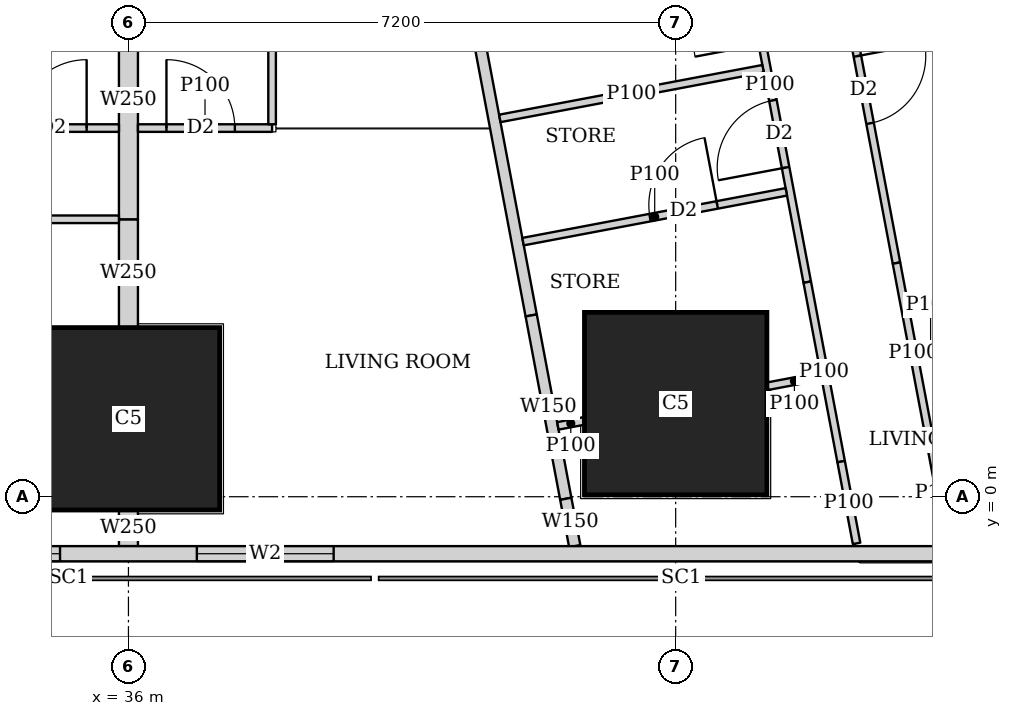
"""IFC4 building model, lengths in metres.
Left out: names, types, materials, properties, quantities, classifications, styles, units other than length and angle.
Written with IfcOpenShell. Run it as: python <this file> out.ifc"""

import sys

from ifc_helpers import new_model, si_unit, direction, frame, frame_2d, origin, origin_2d, place, context, subcontext, project, spatial, rectangle, extrude, element, fill, save


model = new_model("IFC4")
c1 = context("Model", 3, precision=1e-05, world=origin(), true_north=direction((0.0, 1.0)))
c2 = subcontext(c1, "Body", "Model", "MODEL_VIEW")
j1 = project(units=[si_unit("LENGTHUNIT", "METRE"), si_unit("PLANEANGLEUNIT", "RADIAN")], contexts=[c1])
p1 = place(None, origin())
s1 = spatial("IfcSite", under=j1, at=p1, CompositionType="ELEMENT")
p2 = place(p1, origin())
s2 = spatial("IfcBuilding", under=s1, at=p2, CompositionType="ELEMENT")
p3 = place(p2, frame((0.0, 0.0, 227.45)))
s3 = spatial("IfcBuildingStorey", under=s2, at=p3, CompositionType="ELEMENT", Elevation=227.45)
for number, where, z_axis, x_axis in (
    (1, (36.0, 1.025, 0.0), (0.0, 0.0, 1.0), (1.0, 0.0, 0.0)),
    (2, (43.2, 1.225, 0.0), (0.0, 0.0, 1.0), (1.0, 0.0, 0.0)),
):
    element("IfcColumn", number, at=place(p3, frame(where, z_axis=z_axis, x_axis=x_axis)), inside=s3, PredefinedType="COLUMN", context=c2, shape_type="SweptSolid", body=[
        extrude(rectangle(XDim=2.4, YDim=2.4, at=origin_2d()), origin(), (0.0, 0.0, 1.0), 3.75),
    ])
p4 = place(p3, frame((14.563, -0.75, 0.0), z_axis=(0.0, 0.0, 1.0), x_axis=(1.0, 0.0, 0.0)))
e3 = element("IfcWall", 3, at=p4, inside=s3, PredefinedType="SOLIDWALL", context=c2, shape_type="SweptSolid", body=[
    extrude(rectangle(XDim=33.228, YDim=0.2, at=frame_2d((16.614, 0.0))), origin(), (0.0, 0.0, 1.0), 3.5),
])
p5 = place(p4, frame((2.319, 0.0, 0.9)))
e4 = element("IfcOpeningElement", 4, at=p5, cuts=e3, PredefinedType="OPENING", context=c2, shape_type="SweptSolid", body=[
    extrude(rectangle(XDim=2.4, YDim=1.5, at=frame_2d((1.2, 0.75))), frame((0.0, 0.11, 0.0), z_axis=(0.0, -1.0, 0.0), x_axis=(1.0, 0.0, 0.0)), (0.0, 0.0, 1.0), 0.22),
])
p6 = place(p4, frame((7.937, 0.0, 0.9)))
e5 = element("IfcOpeningElement", 5, at=p6, cuts=e3, PredefinedType="OPENING", context=c2, shape_type="SweptSolid", body=[
    extrude(rectangle(XDim=1.8, YDim=1.5, at=frame_2d((0.9, 0.75))), frame((0.0, 0.11, 0.0), z_axis=(0.0, -1.0, 0.0), x_axis=(1.0, 0.0, 0.0)), (0.0, 0.0, 1.0), 0.22),
])
p7 = place(p4, frame((11.537, 0.0, 0.9)))
e6 = element("IfcOpeningElement", 6, at=p7, cuts=e3, PredefinedType="OPENING", context=c2, shape_type="SweptSolid", body=[
    extrude(rectangle(XDim=1.8, YDim=1.5, at=frame_2d((0.9, 0.75))), frame((0.0, 0.11, 0.0), z_axis=(0.0, -1.0, 0.0), x_axis=(1.0, 0.0, 0.0)), (0.0, 0.0, 1.0), 0.22),
])
p8 = place(p4, frame((15.137, 0.0, 0.9)))
e7 = element("IfcOpeningElement", 7, at=p8, cuts=e3, PredefinedType="OPENING", context=c2, shape_type="SweptSolid", body=[
    extrude(rectangle(XDim=1.8, YDim=1.5, at=frame_2d((0.9, 0.75))), frame((0.0, 0.11, 0.0), z_axis=(0.0, -1.0, 0.0), x_axis=(1.0, 0.0, 0.0)), (0.0, 0.0, 1.0), 0.22),
])
p9 = place(p4, frame((18.737, 0.0, 0.9)))
e8 = element("IfcOpeningElement", 8, at=p9, cuts=e3, PredefinedType="OPENING", context=c2, shape_type="SweptSolid", body=[
    extrude(rectangle(XDim=1.8, YDim=1.5, at=frame_2d((0.9, 0.75))), frame((0.0, 0.11, 0.0), z_axis=(0.0, -1.0, 0.0), x_axis=(1.0, 0.0, 0.0)), (0.0, 0.0, 1.0), 0.22),
])
p10 = place(p4, frame((22.337, 0.0, 0.9)))
e9 = element("IfcOpeningElement", 9, at=p10, cuts=e3, PredefinedType="OPENING", context=c2, shape_type="SweptSolid", body=[
    extrude(rectangle(XDim=1.8, YDim=1.5, at=frame_2d((0.9, 0.75))), frame((0.0, 0.11, 0.0), z_axis=(0.0, -1.0, 0.0), x_axis=(1.0, 0.0, 0.0)), (0.0, 0.0, 1.0), 0.22),
])
p11 = place(p3, frame((50.653, 2.703, 0.0), z_axis=(0.0, 0.0, 1.0), x_axis=(-0.185612026696, 0.982623109613, 0.0)))
e10 = element("IfcWall", 10, at=p11, inside=s3, PredefinedType="SOLIDWALL", context=c2, shape_type="SweptSolid", body=[
    extrude(rectangle(XDim=41.393, YDim=0.2, at=frame_2d((20.697, 0.0))), origin(), (0.0, 0.0, 1.0), 3.5),
])
p12 = place(p11, frame((1.633, 0.0, 0.9)))
e11 = element("IfcOpeningElement", 11, at=p12, cuts=e10, PredefinedType="OPENING", context=c2, shape_type="SweptSolid", body=[
    extrude(rectangle(XDim=1.8, YDim=1.5, at=frame_2d((0.9, 0.75))), frame((0.0, 0.11, 0.0), z_axis=(0.0, -1.0, 0.0), x_axis=(1.0, 0.0, 0.0)), (0.0, 0.0, 1.0), 0.22),
])
p13 = place(p11, frame((6.032, 0.0, 0.9)))
e12 = element("IfcOpeningElement", 12, at=p13, cuts=e10, PredefinedType="OPENING", context=c2, shape_type="SweptSolid", body=[
    extrude(rectangle(XDim=1.8, YDim=1.5, at=frame_2d((0.9, 0.75))), frame((0.0, 0.11, 0.0), z_axis=(0.0, -1.0, 0.0), x_axis=(1.0, 0.0, 0.0)), (0.0, 0.0, 1.0), 0.22),
])
p14 = place(p11, frame((9.848, 0.0, 0.9)))
e13 = element("IfcOpeningElement", 13, at=p14, cuts=e10, PredefinedType="OPENING", context=c2, shape_type="SweptSolid", body=[
    extrude(rectangle(XDim=1.8, YDim=1.5, at=frame_2d((0.9, 0.75))), frame((0.0, 0.11, 0.0), z_axis=(0.0, -1.0, 0.0), x_axis=(1.0, 0.0, 0.0)), (0.0, 0.0, 1.0), 0.22),
])
p15 = place(p11, frame((13.664, 0.0, 0.9)))
e14 = element("IfcOpeningElement", 14, at=p15, cuts=e10, PredefinedType="OPENING", context=c2, shape_type="SweptSolid", body=[
    extrude(rectangle(XDim=1.8, YDim=1.5, at=frame_2d((0.9, 0.75))), frame((0.0, 0.11, 0.0), z_axis=(0.0, -1.0, 0.0), x_axis=(1.0, 0.0, 0.0)), (0.0, 0.0, 1.0), 0.22),
])
p16 = place(p11, frame((17.481, 0.0, 0.9)))
e15 = element("IfcOpeningElement", 15, at=p16, cuts=e10, PredefinedType="OPENING", context=c2, shape_type="SweptSolid", body=[
    extrude(rectangle(XDim=1.8, YDim=1.5, at=frame_2d((0.9, 0.75))), frame((0.0, 0.11, 0.0), z_axis=(0.0, -1.0, 0.0), x_axis=(1.0, 0.0, 0.0)), (0.0, 0.0, 1.0), 0.22),
])
p17 = place(p11, frame((21.297, 0.0, 0.9)))
e16 = element("IfcOpeningElement", 16, at=p17, cuts=e10, PredefinedType="OPENING", context=c2, shape_type="SweptSolid", body=[
    extrude(rectangle(XDim=1.8, YDim=1.5, at=frame_2d((0.9, 0.75))), frame((0.0, 0.11, 0.0), z_axis=(0.0, -1.0, 0.0), x_axis=(1.0, 0.0, 0.0)), (0.0, 0.0, 1.0), 0.22),
])
p18 = place(p11, frame((25.113, 0.0, 0.9)))
e17 = element("IfcOpeningElement", 17, at=p18, cuts=e10, PredefinedType="OPENING", context=c2, shape_type="SweptSolid", body=[
    extrude(rectangle(XDim=1.8, YDim=1.5, at=frame_2d((0.9, 0.75))), frame((0.0, 0.11, 0.0), z_axis=(0.0, -1.0, 0.0), x_axis=(1.0, 0.0, 0.0)), (0.0, 0.0, 1.0), 0.22),
])
p19 = place(p11, frame((28.93, 0.0, 0.9)))
e18 = element("IfcOpeningElement", 18, at=p19, cuts=e10, PredefinedType="OPENING", context=c2, shape_type="SweptSolid", body=[
    extrude(rectangle(XDim=1.8, YDim=1.5, at=frame_2d((0.9, 0.75))), frame((0.0, 0.11, 0.0), z_axis=(0.0, -1.0, 0.0), x_axis=(1.0, 0.0, 0.0)), (0.0, 0.0, 1.0), 0.22),
])
p20 = place(p11, frame((32.746, 0.0, 0.9)))
e19 = element("IfcOpeningElement", 19, at=p20, cuts=e10, PredefinedType="OPENING", context=c2, shape_type="SweptSolid", body=[
    extrude(rectangle(XDim=1.8, YDim=1.5, at=frame_2d((0.9, 0.75))), frame((0.0, 0.11, 0.0), z_axis=(0.0, -1.0, 0.0), x_axis=(1.0, 0.0, 0.0)), (0.0, 0.0, 1.0), 0.22),
])
p21 = place(p11, frame((36.481, 0.0, 0.9)))
e20 = element("IfcOpeningElement", 20, at=p21, cuts=e10, PredefinedType="OPENING", context=c2, shape_type="SweptSolid", body=[
    extrude(rectangle(XDim=1.8, YDim=1.5, at=frame_2d((0.9, 0.75))), frame((0.0, 0.11, 0.0), z_axis=(0.0, -1.0, 0.0), x_axis=(1.0, 0.0, 0.0)), (0.0, 0.0, 1.0), 0.22),
])
p22 = place(p3, frame((33.68, 42.723, 0.0), z_axis=(0.0, 0.0, 1.0), x_axis=(0.185601160014, -0.982625162207, 0.0)))
e21 = element("IfcWall", 21, at=p22, inside=s3, PredefinedType="SOLIDWALL", context=c2, shape_type="SweptSolid", body=[
    extrude(rectangle(XDim=41.051, YDim=0.15, at=frame_2d((20.526, 0.0))), origin(), (0.0, 0.0, 1.0), 2.5),
])
p23 = place(p22, frame((16.123, 0.0, 0.0)))
e22 = element("IfcOpeningElement", 22, at=p23, cuts=e21, PredefinedType="OPENING", context=c2, shape_type="SweptSolid", body=[
    extrude(rectangle(XDim=1.0, YDim=2.1, at=frame_2d((0.5, 1.05))), frame((0.0, 0.085, 0.0), z_axis=(0.0, -1.0, 0.0), x_axis=(1.0, 0.0, 0.0)), (0.0, 0.0, 1.0), 0.17),
])
p24 = place(p22, frame((19.938, 0.0, 0.0)))
e23 = element("IfcOpeningElement", 23, at=p24, cuts=e21, PredefinedType="OPENING", context=c2, shape_type="SweptSolid", body=[
    extrude(rectangle(XDim=1.0, YDim=2.1, at=frame_2d((0.5, 1.05))), frame((0.0, 0.085, 0.0), z_axis=(0.0, -1.0, 0.0), x_axis=(1.0, 0.0, 0.0)), (0.0, 0.0, 1.0), 0.17),
])
p25 = place(p22, frame((30.902, 0.0, 0.0)))
e24 = element("IfcOpeningElement", 24, at=p25, cuts=e21, PredefinedType="OPENING", context=c2, shape_type="SweptSolid", body=[
    extrude(rectangle(XDim=1.0, YDim=2.1, at=frame_2d((0.5, 1.05))), frame((0.0, 0.085, 0.0), z_axis=(0.0, -1.0, 0.0), x_axis=(1.0, 0.0, 0.0)), (0.0, 0.0, 1.0), 0.17),
])
p26 = place(p3, frame((41.299, 2.385, 0.0), z_axis=(0.0, 0.0, 1.0), x_axis=(0.18529731833, -0.982682504077, 0.0)))
e25 = element("IfcWall", 25, at=p26, inside=s3, PredefinedType="SOLIDWALL", context=c2, shape_type="SweptSolid", body=[
    extrude(rectangle(XDim=2.455, YDim=0.15, at=frame_2d((1.227, 0.0))), origin(), (0.0, 0.0, 1.0), 2.05),
])
p27 = place(p3, frame((41.754, -0.027, 0.0), z_axis=(0.0, 0.0, 1.0), x_axis=(0.186404157015, -0.982473149886, 0.0)))
e26 = element("IfcWall", 26, at=p27, inside=s3, PredefinedType="SOLIDWALL", context=c2, shape_type="SweptSolid", body=[
    extrude(rectangle(XDim=0.634, YDim=0.15, at=frame_2d((0.317, 0.0))), origin(), (0.0, 0.0, 1.0), 3.5),
])
p28 = place(p3, frame((35.875, 3.65, 0.0), z_axis=(0.0, 0.0, 1.0), x_axis=(-1.0, 0.0, 0.0)))
e27 = element("IfcWall", 27, at=p28, inside=s3, PredefinedType="PARTITIONING", context=c2, shape_type="SweptSolid", body=[
    extrude(rectangle(XDim=7.075, YDim=0.1, at=frame_2d((3.538, 0.0))), origin(), (0.0, 0.0, 1.0), 3.5),
])
p29 = place(p28, frame((4.95, 0.0, 0.0)))
e28 = element("IfcOpeningElement", 28, at=p29, cuts=e27, PredefinedType="OPENING", context=c2, shape_type="SweptSolid", body=[
    extrude(rectangle(XDim=0.9, YDim=2.1, at=frame_2d((0.45, 1.05))), frame((0.0, 0.06, 0.0), z_axis=(0.0, -1.0, 0.0), x_axis=(1.0, 0.0, 0.0)), (0.0, 0.0, 1.0), 0.12),
])
p30 = place(p28, frame((2.375, 0.0, 0.0)))
e29 = element("IfcOpeningElement", 29, at=p30, cuts=e27, PredefinedType="OPENING", context=c2, shape_type="SweptSolid", body=[
    extrude(rectangle(XDim=0.9, YDim=2.1, at=frame_2d((0.45, 1.05))), frame((0.0, 0.06, 0.0), z_axis=(0.0, -1.0, 0.0), x_axis=(1.0, 0.0, 0.0)), (0.0, 0.0, 1.0), 0.12),
])
p31 = place(p3, frame((35.875, 4.85, 0.0), z_axis=(0.0, 0.0, 1.0), x_axis=(-1.0, 0.0, 0.0)))
e30 = element("IfcWall", 30, at=p31, inside=s3, PredefinedType="PARTITIONING", context=c2, shape_type="SweptSolid", body=[
    extrude(rectangle(XDim=7.075, YDim=0.1, at=frame_2d((3.538, 0.0))), origin(), (0.0, 0.0, 1.0), 3.5),
])
p32 = place(p31, frame((5.6, 0.0, 0.0)))
e31 = element("IfcOpeningElement", 31, at=p32, cuts=e30, PredefinedType="OPENING", context=c2, shape_type="SweptSolid", body=[
    extrude(rectangle(XDim=0.9, YDim=2.1, at=frame_2d((0.45, 1.05))), frame((0.0, 0.06, 0.0), z_axis=(0.0, -1.0, 0.0), x_axis=(1.0, 0.0, 0.0)), (0.0, 0.0, 1.0), 0.12),
])
p33 = place(p31, frame((2.225, 0.0, 0.0)))
e32 = element("IfcOpeningElement", 32, at=p33, cuts=e30, PredefinedType="OPENING", context=c2, shape_type="SweptSolid", body=[
    extrude(rectangle(XDim=0.9, YDim=2.1, at=frame_2d((0.45, 1.05))), frame((0.0, 0.06, 0.0), z_axis=(0.0, -1.0, 0.0), x_axis=(1.0, 0.0, 0.0)), (0.0, 0.0, 1.0), 0.12),
])
p34 = place(p31, frame((3.8, 0.0, 0.0)))
e33 = element("IfcOpeningElement", 33, at=p34, cuts=e30, PredefinedType="OPENING", context=c2, shape_type="SweptSolid", body=[
    extrude(rectangle(XDim=0.9, YDim=2.1, at=frame_2d((0.45, 1.05))), frame((0.0, 0.06, 0.0), z_axis=(0.0, -1.0, 0.0), x_axis=(1.0, 0.0, 0.0)), (0.0, 0.0, 1.0), 0.12),
])
p35 = place(p31, frame((0.425, 0.0, 0.0)))
e34 = element("IfcOpeningElement", 34, at=p35, cuts=e30, PredefinedType="OPENING", context=c2, shape_type="SweptSolid", body=[
    extrude(rectangle(XDim=0.9, YDim=2.1, at=frame_2d((0.45, 1.05))), frame((0.0, 0.06, 0.0), z_axis=(0.0, -1.0, 0.0), x_axis=(1.0, 0.0, 0.0)), (0.0, 0.0, 1.0), 0.12),
])
p36 = place(p3, frame((37.89, 4.85, 0.0), z_axis=(0.0, 0.0, 1.0), x_axis=(-1.0, 0.0, 0.0)))
e35 = element("IfcWall", 35, at=p36, inside=s3, PredefinedType="PARTITIONING", context=c2, shape_type="SweptSolid", body=[
    extrude(rectangle(XDim=1.765, YDim=0.1, at=frame_2d((0.882, 0.0))), origin(), (0.0, 0.0, 1.0), 3.5),
])
p37 = place(p36, frame((0.49, 0.0, 0.0)))
e36 = element("IfcOpeningElement", 36, at=p37, cuts=e35, PredefinedType="OPENING", context=c2, shape_type="SweptSolid", body=[
    extrude(rectangle(XDim=0.9, YDim=2.1, at=frame_2d((0.45, 1.05))), frame((0.0, 0.06, 0.0), z_axis=(0.0, -1.0, 0.0), x_axis=(1.0, 0.0, 0.0)), (0.0, 0.0, 1.0), 0.12),
])
p38 = place(p3, frame((37.89, 4.9, 0.0), z_axis=(0.0, 0.0, 1.0), x_axis=(0.0, 1.0, 0.0)))
e37 = element("IfcWall", 37, at=p38, inside=s3, PredefinedType="PARTITIONING", context=c2, shape_type="SweptSolid", body=[
    extrude(rectangle(XDim=3.525, YDim=0.1, at=frame_2d((1.763, 0.0))), origin(), (0.0, 0.0, 1.0), 3.5),
])
p39 = place(p3, frame((36.0, -0.65, 0.0), z_axis=(0.0, 0.0, 1.0), x_axis=(0.0, 1.0, 0.0)))
e38 = element("IfcWall", 38, at=p39, inside=s3, PredefinedType="SOLIDWALL", context=c2, shape_type="SweptSolid", body=[
    extrude(rectangle(XDim=0.474, YDim=0.25, at=frame_2d((0.237, 0.0))), origin(), (0.0, 0.0, 1.0), 2.05),
])
p40 = place(p3, frame((36.0, 2.226, 0.0), z_axis=(0.0, 0.0, 1.0), x_axis=(0.0, 1.0, 0.0)))
e39 = element("IfcWall", 39, at=p40, inside=s3, PredefinedType="SOLIDWALL", context=c2, shape_type="SweptSolid", body=[
    extrude(rectangle(XDim=1.424, YDim=0.25, at=frame_2d((0.712, 0.0))), origin(), (0.0, 0.0, 1.0), 2.05),
])
p41 = place(p3, frame((36.0, 3.65, 0.0), z_axis=(0.0, 0.0, 1.0), x_axis=(0.0, 1.0, 0.0)))
e40 = element("IfcWall", 40, at=p41, inside=s3, PredefinedType="SOLIDWALL", context=c2, shape_type="SweptSolid", body=[
    extrude(rectangle(XDim=3.149, YDim=0.25, at=frame_2d((1.575, 0.0))), origin(), (0.0, 0.0, 1.0), 3.5),
])
p42 = place(p3, frame((44.727, 10.366, 0.0), z_axis=(0.0, 0.0, 1.0), x_axis=(0.185678775129, -0.982610498858, 0.0)))
e41 = element("IfcWall", 41, at=p42, inside=s3, PredefinedType="PARTITIONING", context=c2, shape_type="SweptSolid", body=[
    extrude(rectangle(XDim=7.421, YDim=0.1, at=frame_2d((3.71, 0.0))), origin(), (0.0, 0.0, 1.0), 3.5),
])
p43 = place(p42, frame((0.151, 0.0, 0.0)))
e42 = element("IfcOpeningElement", 42, at=p43, cuts=e41, PredefinedType="OPENING", context=c2, shape_type="SweptSolid", body=[
    extrude(rectangle(XDim=0.9, YDim=2.1, at=frame_2d((0.45, 1.05))), frame((0.0, 0.06, 0.0), z_axis=(0.0, -1.0, 0.0), x_axis=(1.0, 0.0, 0.0)), (0.0, 0.0, 1.0), 0.12),
])
p44 = place(p42, frame((4.65, 0.0, 0.0)))
e43 = element("IfcOpeningElement", 43, at=p44, cuts=e41, PredefinedType="OPENING", context=c2, shape_type="SweptSolid", body=[
    extrude(rectangle(XDim=0.9, YDim=2.1, at=frame_2d((0.45, 1.05))), frame((0.0, 0.06, 0.0), z_axis=(0.0, -1.0, 0.0), x_axis=(1.0, 0.0, 0.0)), (0.0, 0.0, 1.0), 0.12),
])
p45 = place(p3, frame((46.105, 3.074, 0.0), z_axis=(0.0, 0.0, 1.0), x_axis=(0.185631845838, -0.982619365681, 0.0)))
e44 = element("IfcWall", 44, at=p45, inside=s3, PredefinedType="PARTITIONING", context=c2, shape_type="SweptSolid", body=[
    extrude(rectangle(XDim=2.403, YDim=0.1, at=frame_2d((1.201, 0.0))), origin(), (0.0, 0.0, 1.0), 2.05),
])
p46 = place(p3, frame((46.551, 0.713, 0.0), z_axis=(0.0, 0.0, 1.0), x_axis=(0.185407859198, -0.982661653748, 0.0)))
e45 = element("IfcWall", 45, at=p46, inside=s3, PredefinedType="PARTITIONING", context=c2, shape_type="SweptSolid", body=[
    extrude(rectangle(XDim=1.343, YDim=0.1, at=frame_2d((0.671, 0.0))), origin(), (0.0, 0.0, 1.0), 3.5),
])
p47 = place(p3, frame((43.949, 8.02, 0.0), z_axis=(0.0, 0.0, 1.0), x_axis=(0.185656792073, -0.982614652627, 0.0)))
e46 = element("IfcWall", 46, at=p47, inside=s3, PredefinedType="PARTITIONING", context=c2, shape_type="SweptSolid", body=[
    extrude(rectangle(XDim=5.289, YDim=0.1, at=frame_2d((2.645, 0.0))), origin(), (0.0, 0.0, 1.0), 3.5),
])
p48 = place(p47, frame((1.2, 0.0, 0.0)))
e47 = element("IfcOpeningElement", 47, at=p48, cuts=e46, PredefinedType="OPENING", context=c2, shape_type="SweptSolid", body=[
    extrude(rectangle(XDim=0.9, YDim=2.1, at=frame_2d((0.45, 1.05))), frame((0.0, 0.06, 0.0), z_axis=(0.0, -1.0, 0.0), x_axis=(1.0, 0.0, 0.0)), (0.0, 0.0, 1.0), 0.12),
])
p49 = place(p47, frame((2.855, 0.0, 0.0)))
e48 = element("IfcOpeningElement", 48, at=p49, cuts=e46, PredefinedType="OPENING", context=c2, shape_type="SweptSolid", body=[
    extrude(rectangle(XDim=0.9, YDim=2.1, at=frame_2d((0.45, 1.05))), frame((0.0, 0.06, 0.0), z_axis=(0.0, -1.0, 0.0), x_axis=(1.0, 0.0, 0.0)), (0.0, 0.0, 1.0), 0.12),
])
p50 = place(p3, frame((44.931, 2.823, 0.0), z_axis=(0.0, 0.0, 1.0), x_axis=(0.185631845838, -0.982619365681, 0.0)))
e49 = element("IfcWall", 49, at=p50, inside=s3, PredefinedType="PARTITIONING", context=c2, shape_type="SweptSolid", body=[
    extrude(rectangle(XDim=2.403, YDim=0.1, at=frame_2d((1.201, 0.0))), origin(), (0.0, 0.0, 1.0), 2.05),
])
p51 = place(p3, frame((45.377, 0.462, 0.0), z_axis=(0.0, 0.0, 1.0), x_axis=(0.185513480919, -0.982641719243, 0.0)))
e50 = element("IfcWall", 50, at=p51, inside=s3, PredefinedType="PARTITIONING", context=c2, shape_type="SweptSolid", body=[
    extrude(rectangle(XDim=1.095, YDim=0.1, at=frame_2d((0.547, 0.0))), origin(), (0.0, 0.0, 1.0), 3.5),
])
p52 = place(p3, frame((46.738, 2.006, 0.0), z_axis=(0.0, 0.0, 1.0), x_axis=(-0.982820466874, -0.184564161994, 0.0)))
e51 = element("IfcWall", 51, at=p52, inside=s3, PredefinedType="PARTITIONING", context=c2, shape_type="SweptSolid", body=[
    extrude(rectangle(XDim=0.374, YDim=0.1, at=frame_2d((0.187, 0.0))), origin(), (0.0, 0.0, 1.0), 2.05),
])
p53 = place(p3, frame((45.114, 1.587, 0.0), z_axis=(0.0, 0.0, 1.0), x_axis=(-0.982671022916, -0.185358195723, 0.0)))
e52 = element("IfcWall", 52, at=p53, inside=s3, PredefinedType="PARTITIONING", context=c2, shape_type="SweptSolid", body=[
    extrude(rectangle(XDim=0.717, YDim=0.1, at=frame_2d((0.358, 0.0))), origin(), (0.0, 0.0, 1.0), 2.05),
])
p54 = place(p3, frame((41.99, 0.996, 0.0), z_axis=(0.0, 0.0, 1.0), x_axis=(-0.982639822555, -0.185523527159, 0.0)))
e53 = element("IfcWall", 53, at=p54, inside=s3, PredefinedType="PARTITIONING", context=c2, shape_type="SweptSolid", body=[
    extrude(rectangle(XDim=0.346, YDim=0.1, at=frame_2d((0.173, 0.0))), origin(), (0.0, 0.0, 1.0), 2.05),
])
p55 = place(p3, frame((44.35, 5.631, 0.0), z_axis=(0.0, 0.0, 1.0), x_axis=(-0.982638553676, -0.185530247748, 0.0)))
e54 = element("IfcWall", 54, at=p55, inside=s3, PredefinedType="PARTITIONING", context=c2, shape_type="SweptSolid", body=[
    extrude(rectangle(XDim=3.525, YDim=0.1, at=frame_2d((1.763, 0.0))), origin(), (0.0, 0.0, 1.0), 3.5),
])
p56 = place(p3, frame((41.192, 3.356, 0.0), z_axis=(0.0, 0.0, 1.0), x_axis=(0.982588017646, 0.185797706064, 0.0)))
e55 = element("IfcWall", 55, at=p56, inside=s3, PredefinedType="PARTITIONING", context=c2, shape_type="SweptSolid", body=[
    extrude(rectangle(XDim=3.525, YDim=0.1, at=frame_2d((1.763, 0.0))), origin(), (0.0, 0.0, 1.0), 3.5),
])
p57 = place(p56, frame((1.7, 0.0, 0.0)))
e56 = element("IfcOpeningElement", 56, at=p57, cuts=e55, PredefinedType="OPENING", context=c2, shape_type="SweptSolid", body=[
    extrude(rectangle(XDim=0.9, YDim=2.1, at=frame_2d((0.45, 1.05))), frame((0.0, 0.06, 0.0), z_axis=(0.0, -1.0, 0.0), x_axis=(1.0, 0.0, 0.0)), (0.0, 0.0, 1.0), 0.12),
])
p58 = place(p9, origin())
e57 = element("IfcWindow", 57, at=p58, inside=s3, PartitioningType="SINGLE_PANEL", PredefinedType="WINDOW", context=c2, shape_type="SweptSolid", body=[
    extrude(rectangle(XDim=1.8, YDim=1.5, at=frame_2d((0.9, 0.75))), frame((0.0, 0.03, 0.0), z_axis=(0.0, -1.0, 0.0), x_axis=(1.0, 0.0, 0.0)), (0.0, 0.0, 1.0), 0.06),
])
fill(e8, e57)
p59 = place(p10, origin())
e58 = element("IfcWindow", 58, at=p59, inside=s3, PartitioningType="SINGLE_PANEL", PredefinedType="WINDOW", context=c2, shape_type="SweptSolid", body=[
    extrude(rectangle(XDim=1.8, YDim=1.5, at=frame_2d((0.9, 0.75))), frame((0.0, 0.03, 0.0), z_axis=(0.0, -1.0, 0.0), x_axis=(1.0, 0.0, 0.0)), (0.0, 0.0, 1.0), 0.06),
])
fill(e9, e58)
p60 = place(p35, origin())
e59 = element("IfcDoor", 59, at=p60, inside=s3, OperationType="SINGLE_SWING_RIGHT", PredefinedType="DOOR", context=c2, shape_type="SweptSolid", body=[
    extrude(rectangle(XDim=0.9, YDim=2.1, at=frame_2d((0.45, 1.05))), frame((0.0, 0.025, 0.0), z_axis=(0.0, -1.0, 0.0), x_axis=(1.0, 0.0, 0.0)), (0.0, 0.0, 1.0), 0.05),
])
fill(e34, e59)
p61 = place(p37, origin())
e60 = element("IfcDoor", 60, at=p61, inside=s3, OperationType="SINGLE_SWING_LEFT", PredefinedType="DOOR", context=c2, shape_type="SweptSolid", body=[
    extrude(rectangle(XDim=0.9, YDim=2.1, at=frame_2d((0.45, 1.05))), frame((0.0, 0.025, 0.0), z_axis=(0.0, -1.0, 0.0), x_axis=(1.0, 0.0, 0.0)), (0.0, 0.0, 1.0), 0.05),
])
fill(e36, e60)
p62 = place(p44, origin())
e61 = element("IfcDoor", 61, at=p62, inside=s3, OperationType="SINGLE_SWING_LEFT", PredefinedType="DOOR", context=c2, shape_type="SweptSolid", body=[
    extrude(rectangle(XDim=0.9, YDim=2.1, at=frame_2d((0.45, 1.05))), frame((0.0, 0.025, 0.0), z_axis=(0.0, -1.0, 0.0), x_axis=(1.0, 0.0, 0.0)), (0.0, 0.0, 1.0), 0.05),
])
fill(e43, e61)
p63 = place(p49, origin())
e62 = element("IfcDoor", 62, at=p63, inside=s3, OperationType="SINGLE_SWING_LEFT", PredefinedType="DOOR", context=c2, shape_type="SweptSolid", body=[
    extrude(rectangle(XDim=0.9, YDim=2.1, at=frame_2d((0.45, 1.05))), frame((0.0, 0.025, 0.0), z_axis=(0.0, -1.0, 0.0), x_axis=(1.0, 0.0, 0.0)), (0.0, 0.0, 1.0), 0.05),
])
fill(e48, e62)
p64 = place(p57, origin())
e63 = element("IfcDoor", 63, at=p64, inside=s3, OperationType="SINGLE_SWING_RIGHT", PredefinedType="DOOR", context=c2, shape_type="SweptSolid", body=[
    extrude(rectangle(XDim=0.9, YDim=2.1, at=frame_2d((0.45, 1.05))), frame((0.0, 0.025, 0.0), z_axis=(0.0, -1.0, 0.0), x_axis=(1.0, 0.0, 0.0)), (0.0, 0.0, 1.0), 0.05),
])
fill(e56, e63)
save(model, sys.argv[1])
